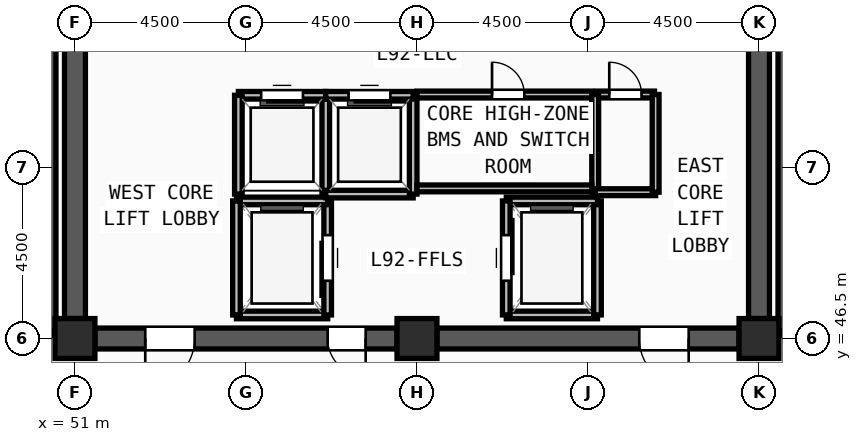
"""IFC4 building model, lengths in metres.
Left out: names, types, materials, properties, quantities, classifications, styles, units other than length and angle.
Written with IfcOpenShell. Run it as: python <this file> out.ifc"""

import sys

from ifc_helpers import new_model, si_unit, direction, frame, frame_2d, origin, origin_2d, place, context, subcontext, project, spatial, rectangle, extrude, source, transform, mapped, element, fill, save


model = new_model("IFC4")
c1 = context("Model", 3, precision=1e-05, world=origin(), true_north=direction((0.0, 1.0)))
c2 = subcontext(c1, "Body", "Model", "MODEL_VIEW")
j1 = project(units=[si_unit("LENGTHUNIT", "METRE"), si_unit("PLANEANGLEUNIT", "RADIAN")], contexts=[c1])
p1 = place(None, origin())
s1 = spatial("IfcSite", under=j1, at=p1, CompositionType="ELEMENT")
p2 = place(p1, origin())
s2 = spatial("IfcBuilding", under=s1, at=p2, CompositionType="ELEMENT")
p3 = place(p2, frame((0.0, 0.0, 355.8)))
s3 = spatial("IfcBuildingStorey", under=s2, at=p3, CompositionType="ELEMENT", Elevation=355.8)
m1 = source(origin(), c2, "Body", "SweptSolid", [
    extrude(rectangle(XDim=1.05, YDim=1.05, at=origin_2d()), origin(), (0.0, 0.0, 1.0), 4.8),
])
for number, where, z_axis, x_axis in (
    (1, (51.0, 46.5, 0.0), (0.0, 0.0, 1.0), (1.0, 0.0, 0.0)),
    (2, (60.0, 46.5, 0.0), (0.0, 0.0, 1.0), (1.0, 0.0, 0.0)),
    (3, (69.0, 46.5, 0.0), (0.0, 0.0, 1.0), (1.0, 0.0, 0.0)),
):
    element("IfcColumn", number, at=place(p3, frame(where, z_axis=z_axis, x_axis=x_axis)), inside=s3, PredefinedType="COLUMN", context=c2, shape_type="MappedRepresentation", body=[
        mapped(m1, transform((0.0, 0.0, 0.0), x_axis=(1.0, 0.0, 0.0), y_axis=(0.0, 1.0, 0.0), z_axis=(0.0, 0.0, 1.0), scale=1.0)),
    ])
p4 = place(p3, frame((69.0, 60.975, 0.0), z_axis=(0.0, 0.0, 1.0), x_axis=(0.0, -1.0, 0.0)))
e4 = element("IfcWall", 4, at=p4, inside=s3, PredefinedType="SHEAR", context=c2, shape_type="SweptSolid", body=[
    extrude(rectangle(XDim=13.95, YDim=0.55, at=frame_2d((6.975, 0.0))), origin(), (0.0, 0.0, 1.0), 4.35),
])
m2 = source(origin(), c2, "Body", "SweptSolid", [
    extrude(rectangle(XDim=1.2, YDim=2.2, at=frame_2d((0.6, 1.1))), frame((0.0, 0.285, 0.0), z_axis=(0.0, -1.0, 0.0), x_axis=(1.0, 0.0, 0.0)), (0.0, 0.0, 1.0), 0.57),
])
p5 = place(p4, frame((1.425, 0.0, 0.0)))
e5 = element("IfcOpeningElement", 5, at=p5, cuts=e4, PredefinedType="OPENING", context=c2, shape_type="MappedRepresentation", body=[
    mapped(m2, transform((0.0, 0.0, 0.0), x_axis=(1.0, 0.0, 0.0), y_axis=(0.0, 1.0, 0.0), z_axis=(0.0, 0.0, 1.0), scale=1.0)),
])
p6 = place(p3, frame((68.475, 46.5, 0.0), z_axis=(0.0, 0.0, 1.0), x_axis=(-1.0, 0.0, 0.0)))
e6 = element("IfcWall", 6, at=p6, inside=s3, PredefinedType="SHEAR", context=c2, shape_type="SweptSolid", body=[
    extrude(rectangle(XDim=7.95, YDim=0.55, at=frame_2d((3.975, 0.0))), origin(), (0.0, 0.0, 1.0), 4.35),
])
m3 = source(origin(), c2, "Body", "SweptSolid", [
    extrude(rectangle(XDim=1.3, YDim=2.2, at=frame_2d((0.65, 1.1))), frame((0.0, 0.285, 0.0), z_axis=(0.0, -1.0, 0.0), x_axis=(1.0, 0.0, 0.0)), (0.0, 0.0, 1.0), 0.57),
])
p7 = place(p6, frame((1.325, 0.0, 0.0)))
e7 = element("IfcOpeningElement", 7, at=p7, cuts=e6, PredefinedType="OPENING", context=c2, shape_type="MappedRepresentation", body=[
    mapped(m3, transform((0.0, 0.0, 0.0), x_axis=(1.0, 0.0, 0.0), y_axis=(0.0, 1.0, 0.0), z_axis=(0.0, 0.0, 1.0), scale=1.0)),
])
p8 = place(p3, frame((59.475, 46.5, 0.0), z_axis=(0.0, 0.0, 1.0), x_axis=(-1.0, 0.0, 0.0)))
e8 = element("IfcWall", 8, at=p8, inside=s3, PredefinedType="SHEAR", context=c2, shape_type="SweptSolid", body=[
    extrude(rectangle(XDim=7.95, YDim=0.55, at=frame_2d((3.975, 0.0))), origin(), (0.0, 0.0, 1.0), 4.35),
])
p9 = place(p8, frame((5.325, 0.0, 0.0)))
e9 = element("IfcOpeningElement", 9, at=p9, cuts=e8, PredefinedType="OPENING", context=c2, shape_type="MappedRepresentation", body=[
    mapped(m3, transform((0.0, 0.0, 0.0), x_axis=(1.0, 0.0, 0.0), y_axis=(0.0, 1.0, 0.0), z_axis=(0.0, 0.0, 1.0), scale=1.0)),
])
m4 = source(origin(), c2, "Body", "SweptSolid", [
    extrude(rectangle(XDim=1.0, YDim=2.2, at=frame_2d((0.5, 1.1))), frame((0.0, 0.285, 0.0), z_axis=(0.0, -1.0, 0.0), x_axis=(1.0, 0.0, 0.0)), (0.0, 0.0, 1.0), 0.57),
])
p10 = place(p8, frame((0.825, 0.0, 0.0)))
e10 = element("IfcOpeningElement", 10, at=p10, cuts=e8, PredefinedType="OPENING", context=c2, shape_type="MappedRepresentation", body=[
    mapped(m4, transform((0.0, 0.0, 0.0), x_axis=(1.0, 0.0, 0.0), y_axis=(0.0, 1.0, 0.0), z_axis=(0.0, 0.0, 1.0), scale=1.0)),
])
p11 = place(p3, frame((51.0, 47.025, 0.0), z_axis=(0.0, 0.0, 1.0), x_axis=(0.0, 1.0, 0.0)))
e11 = element("IfcWall", 11, at=p11, inside=s3, PredefinedType="SHEAR", context=c2, shape_type="SweptSolid", body=[
    extrude(rectangle(XDim=13.95, YDim=0.55, at=frame_2d((6.975, 0.0))), origin(), (0.0, 0.0, 1.0), 4.35),
])
for number, where, z_axis, x_axis in (
    (12, (50.38, 46.7, 0.0), (0.0, 0.0, 1.0), (0.0, 1.0, 0.0)),
    (13, (69.62, 54.52, 0.0), (0.0, 0.0, 1.0), (0.0, -1.0, 0.0)),
):
    element("IfcWall", number, at=place(p3, frame(where, z_axis=z_axis, x_axis=x_axis)), inside=s3, PredefinedType="SOLIDWALL", context=c2, shape_type="SweptSolid", body=[
        extrude(rectangle(XDim=7.82, YDim=0.24, at=frame_2d((3.91, 0.0))), origin(), (0.0, 0.0, 1.0), 4.35),
    ])
p12 = place(p3, frame((55.25, 47.12, 0.0), z_axis=(0.0, 0.0, 1.0), x_axis=(1.0, 0.0, 0.0)))
e14 = element("IfcWall", 14, at=p12, inside=s3, PredefinedType="SOLIDWALL", context=c2, shape_type="SweptSolid", body=[
    extrude(rectangle(XDim=2.4, YDim=0.2, at=frame_2d((1.2, 0.0))), origin(), (0.0, 0.0, 1.0), 4.35),
])
p13 = place(p3, frame((57.65, 47.12, 0.0), z_axis=(0.0, 0.0, 1.0), x_axis=(0.0, 1.0, 0.0)))
e15 = element("IfcWall", 15, at=p13, inside=s3, PredefinedType="SOLIDWALL", context=c2, shape_type="SweptSolid", body=[
    extrude(rectangle(XDim=3.0, YDim=0.2, at=frame_2d((1.5, 0.0))), origin(), (0.0, 0.0, 1.0), 4.35),
])
m5 = source(origin(), c2, "Body", "SweptSolid", [
    extrude(rectangle(XDim=1.2, YDim=2.3, at=frame_2d((0.6, 1.15))), frame((0.0, 0.11, 0.0), z_axis=(0.0, -1.0, 0.0), x_axis=(1.0, 0.0, 0.0)), (0.0, 0.0, 1.0), 0.22),
])
p14 = place(p13, frame((0.9, 0.0, 0.0)))
e16 = element("IfcOpeningElement", 16, at=p14, cuts=e15, PredefinedType="OPENING", context=c2, shape_type="MappedRepresentation", body=[
    mapped(m5, transform((0.0, 0.0, 0.0), x_axis=(1.0, 0.0, 0.0), y_axis=(0.0, 1.0, 0.0), z_axis=(0.0, 0.0, 1.0), scale=1.0)),
])
p15 = place(p3, frame((57.65, 50.12, 0.0), z_axis=(0.0, 0.0, 1.0), x_axis=(-1.0, 0.0, 0.0)))
e17 = element("IfcWall", 17, at=p15, inside=s3, PredefinedType="SOLIDWALL", context=c2, shape_type="SweptSolid", body=[
    extrude(rectangle(XDim=2.4, YDim=0.2, at=frame_2d((1.2, 0.0))), origin(), (0.0, 0.0, 1.0), 4.35),
])
p16 = place(p3, frame((55.25, 50.12, 0.0), z_axis=(0.0, 0.0, 1.0), x_axis=(0.0, -1.0, 0.0)))
e18 = element("IfcWall", 18, at=p16, inside=s3, PredefinedType="SOLIDWALL", context=c2, shape_type="SweptSolid", body=[
    extrude(rectangle(XDim=3.0, YDim=0.2, at=frame_2d((1.5, 0.0))), origin(), (0.0, 0.0, 1.0), 4.35),
])
p17 = place(p3, frame((62.35, 47.12, 0.0), z_axis=(0.0, 0.0, 1.0), x_axis=(1.0, 0.0, 0.0)))
e19 = element("IfcWall", 19, at=p17, inside=s3, PredefinedType="SOLIDWALL", context=c2, shape_type="SweptSolid", body=[
    extrude(rectangle(XDim=2.4, YDim=0.2, at=frame_2d((1.2, 0.0))), origin(), (0.0, 0.0, 1.0), 4.35),
])
p18 = place(p3, frame((64.75, 47.12, 0.0), z_axis=(0.0, 0.0, 1.0), x_axis=(0.0, 1.0, 0.0)))
e20 = element("IfcWall", 20, at=p18, inside=s3, PredefinedType="SOLIDWALL", context=c2, shape_type="SweptSolid", body=[
    extrude(rectangle(XDim=3.0, YDim=0.2, at=frame_2d((1.5, 0.0))), origin(), (0.0, 0.0, 1.0), 4.35),
])
p19 = place(p3, frame((64.75, 50.12, 0.0), z_axis=(0.0, 0.0, 1.0), x_axis=(-1.0, 0.0, 0.0)))
e21 = element("IfcWall", 21, at=p19, inside=s3, PredefinedType="SOLIDWALL", context=c2, shape_type="SweptSolid", body=[
    extrude(rectangle(XDim=2.4, YDim=0.2, at=frame_2d((1.2, 0.0))), origin(), (0.0, 0.0, 1.0), 4.35),
])
p20 = place(p3, frame((62.35, 50.12, 0.0), z_axis=(0.0, 0.0, 1.0), x_axis=(0.0, -1.0, 0.0)))
e22 = element("IfcWall", 22, at=p20, inside=s3, PredefinedType="SOLIDWALL", context=c2, shape_type="SweptSolid", body=[
    extrude(rectangle(XDim=3.0, YDim=0.2, at=frame_2d((1.5, 0.0))), origin(), (0.0, 0.0, 1.0), 4.35),
])
p21 = place(p20, frame((0.9, 0.0, 0.0)))
e23 = element("IfcOpeningElement", 23, at=p21, cuts=e22, PredefinedType="OPENING", context=c2, shape_type="MappedRepresentation", body=[
    mapped(m5, transform((0.0, 0.0, 0.0), x_axis=(1.0, 0.0, 0.0), y_axis=(0.0, 1.0, 0.0), z_axis=(0.0, 0.0, 1.0), scale=1.0)),
])
p22 = place(p3, frame((57.6, 50.3, 0.0), z_axis=(0.0, 0.0, 1.0), x_axis=(0.0, 1.0, 0.0)))
e24 = element("IfcWall", 24, at=p22, inside=s3, PredefinedType="SOLIDWALL", context=c2, shape_type="SweptSolid", body=[
    extrude(rectangle(XDim=2.6, YDim=0.2, at=frame_2d((1.3, 0.0))), origin(), (0.0, 0.0, 1.0), 4.35),
])
p23 = place(p3, frame((57.6, 52.9, 0.0), z_axis=(0.0, 0.0, 1.0), x_axis=(-1.0, 0.0, 0.0)))
e25 = element("IfcWall", 25, at=p23, inside=s3, PredefinedType="SOLIDWALL", context=c2, shape_type="SweptSolid", body=[
    extrude(rectangle(XDim=2.3, YDim=0.2, at=frame_2d((1.15, 0.0))), origin(), (0.0, 0.0, 1.0), 4.35),
])
m6 = source(origin(), c2, "Body", "SweptSolid", [
    extrude(rectangle(XDim=1.1, YDim=2.2, at=frame_2d((0.55, 1.1))), frame((0.0, 0.11, 0.0), z_axis=(0.0, -1.0, 0.0), x_axis=(1.0, 0.0, 0.0)), (0.0, 0.0, 1.0), 0.22),
])
p24 = place(p23, frame((0.6, 0.0, 0.0)))
e26 = element("IfcOpeningElement", 26, at=p24, cuts=e25, PredefinedType="OPENING", context=c2, shape_type="MappedRepresentation", body=[
    mapped(m6, transform((0.0, 0.0, 0.0), x_axis=(1.0, 0.0, 0.0), y_axis=(0.0, 1.0, 0.0), z_axis=(0.0, 0.0, 1.0), scale=1.0)),
])
p25 = place(p3, frame((55.3, 52.9, 0.0), z_axis=(0.0, 0.0, 1.0), x_axis=(0.0, -1.0, 0.0)))
e27 = element("IfcWall", 27, at=p25, inside=s3, PredefinedType="SOLIDWALL", context=c2, shape_type="SweptSolid", body=[
    extrude(rectangle(XDim=2.6, YDim=0.2, at=frame_2d((1.3, 0.0))), origin(), (0.0, 0.0, 1.0), 4.35),
])
p26 = place(p3, frame((57.6, 50.3, 0.0), z_axis=(0.0, 0.0, 1.0), x_axis=(1.0, 0.0, 0.0)))
e28 = element("IfcWall", 28, at=p26, inside=s3, PredefinedType="SOLIDWALL", context=c2, shape_type="SweptSolid", body=[
    extrude(rectangle(XDim=2.3, YDim=0.2, at=frame_2d((1.15, 0.0))), origin(), (0.0, 0.0, 1.0), 4.35),
])
p27 = place(p3, frame((59.9, 50.3, 0.0), z_axis=(0.0, 0.0, 1.0), x_axis=(0.0, 1.0, 0.0)))
e29 = element("IfcWall", 29, at=p27, inside=s3, PredefinedType="SOLIDWALL", context=c2, shape_type="SweptSolid", body=[
    extrude(rectangle(XDim=2.6, YDim=0.2, at=frame_2d((1.3, 0.0))), origin(), (0.0, 0.0, 1.0), 4.35),
])
p28 = place(p3, frame((59.9, 52.9, 0.0), z_axis=(0.0, 0.0, 1.0), x_axis=(-1.0, 0.0, 0.0)))
e30 = element("IfcWall", 30, at=p28, inside=s3, PredefinedType="SOLIDWALL", context=c2, shape_type="SweptSolid", body=[
    extrude(rectangle(XDim=2.3, YDim=0.2, at=frame_2d((1.15, 0.0))), origin(), (0.0, 0.0, 1.0), 4.35),
])
p29 = place(p28, frame((0.6, 0.0, 0.0)))
e31 = element("IfcOpeningElement", 31, at=p29, cuts=e30, PredefinedType="OPENING", context=c2, shape_type="MappedRepresentation", body=[
    mapped(m6, transform((0.0, 0.0, 0.0), x_axis=(1.0, 0.0, 0.0), y_axis=(0.0, 1.0, 0.0), z_axis=(0.0, 0.0, 1.0), scale=1.0)),
])
p30 = place(p3, frame((60.0, 52.92, 0.0), z_axis=(0.0, 0.0, 1.0), x_axis=(1.0, 0.0, 0.0)))
e32 = element("IfcWall", 32, at=p30, inside=s3, PredefinedType="PARTITIONING", context=c2, shape_type="SweptSolid", body=[
    extrude(rectangle(XDim=4.6, YDim=0.18, at=frame_2d((2.3, 0.0))), origin(), (0.0, 0.0, 1.0), 4.35),
])
m7 = source(origin(), c2, "Body", "SweptSolid", [
    extrude(rectangle(XDim=0.85, YDim=2.1, at=frame_2d((0.425, 1.05))), frame((0.0, 0.1, 0.0), z_axis=(0.0, -1.0, 0.0), x_axis=(1.0, 0.0, 0.0)), (0.0, 0.0, 1.0), 0.2),
])
p31 = place(p30, frame((1.975, 0.0, 0.0)))
e33 = element("IfcOpeningElement", 33, at=p31, cuts=e32, PredefinedType="OPENING", context=c2, shape_type="MappedRepresentation", body=[
    mapped(m7, transform((0.0, 0.0, 0.0), x_axis=(1.0, 0.0, 0.0), y_axis=(0.0, 1.0, 0.0), z_axis=(0.0, 0.0, 1.0), scale=1.0)),
])
p32 = place(p3, frame((64.72, 52.92, 0.0), z_axis=(0.0, 0.0, 1.0), x_axis=(1.0, 0.0, 0.0)))
e34 = element("IfcWall", 34, at=p32, inside=s3, PredefinedType="PARTITIONING", context=c2, shape_type="SweptSolid", body=[
    extrude(rectangle(XDim=1.53, YDim=0.18, at=frame_2d((0.765, 0.0))), origin(), (0.0, 0.0, 1.0), 4.35),
])
p33 = place(p32, frame((0.34, 0.0, 0.0)))
e35 = element("IfcOpeningElement", 35, at=p33, cuts=e34, PredefinedType="OPENING", context=c2, shape_type="MappedRepresentation", body=[
    mapped(m7, transform((0.0, 0.0, 0.0), x_axis=(1.0, 0.0, 0.0), y_axis=(0.0, 1.0, 0.0), z_axis=(0.0, 0.0, 1.0), scale=1.0)),
])
p34 = place(p3, frame((64.69, 50.35, 0.0), z_axis=(0.0, 0.0, 1.0), x_axis=(0.0, 1.0, 0.0)))
e36 = element("IfcWall", 36, at=p34, inside=s3, PredefinedType="PARTITIONING", context=c2, shape_type="SweptSolid", body=[
    extrude(rectangle(XDim=2.57, YDim=0.18, at=frame_2d((1.285, 0.0))), origin(), (0.0, 0.0, 1.0), 4.35),
])
p35 = place(p3, frame((64.69, 50.35, 0.0), z_axis=(0.0, 0.0, 1.0), x_axis=(1.0, 0.0, 0.0)))
e37 = element("IfcWall", 37, at=p35, inside=s3, PredefinedType="PARTITIONING", context=c2, shape_type="SweptSolid", body=[
    extrude(rectangle(XDim=1.59, YDim=0.18, at=frame_2d((0.795, 0.0))), origin(), (0.0, 0.0, 1.0), 4.35),
])
p36 = place(p3, frame((66.28, 50.35, 0.0), z_axis=(0.0, 0.0, 1.0), x_axis=(0.0, 1.0, 0.0)))
e38 = element("IfcWall", 38, at=p36, inside=s3, PredefinedType="PARTITIONING", context=c2, shape_type="SweptSolid", body=[
    extrude(rectangle(XDim=2.57, YDim=0.18, at=frame_2d((1.285, 0.0))), origin(), (0.0, 0.0, 1.0), 4.35),
])
p37 = place(p3, frame((60.0, 50.45, 0.0), z_axis=(0.0, 0.0, 1.0), x_axis=(1.0, 0.0, 0.0)))
e39 = element("IfcWall", 39, at=p37, inside=s3, PredefinedType="PARTITIONING", context=c2, shape_type="SweptSolid", body=[
    extrude(rectangle(XDim=4.6, YDim=0.18, at=frame_2d((2.3, 0.0))), origin(), (0.0, 0.0, 1.0), 4.35),
])
m8 = source(origin(), c2, "Body", "SweptSolid", [
    extrude(rectangle(XDim=1.3, YDim=2.2, at=frame_2d((0.65, 1.1))), frame((0.0, 0.025, 0.0), z_axis=(0.0, -1.0, 0.0), x_axis=(1.0, 0.0, 0.0)), (0.0, 0.0, 1.0), 0.05),
])
p38 = place(p9, origin())
e40 = element("IfcDoor", 40, at=p38, inside=s3, OperationType="SINGLE_SWING_RIGHT", PredefinedType="DOOR", context=c2, shape_type="MappedRepresentation", body=[
    mapped(m8, transform((0.0, 0.0, 0.0), x_axis=(1.0, 0.0, 0.0), y_axis=(0.0, 1.0, 0.0), z_axis=(0.0, 0.0, 1.0), scale=1.0)),
])
fill(e9, e40)
m9 = source(origin(), c2, "Body", "SweptSolid", [
    extrude(rectangle(XDim=1.0, YDim=2.2, at=frame_2d((0.5, 1.1))), frame((0.0, 0.025, 0.0), z_axis=(0.0, -1.0, 0.0), x_axis=(1.0, 0.0, 0.0)), (0.0, 0.0, 1.0), 0.05),
])
p39 = place(p10, origin())
e41 = element("IfcDoor", 41, at=p39, inside=s3, OperationType="SINGLE_SWING_LEFT", PredefinedType="DOOR", context=c2, shape_type="MappedRepresentation", body=[
    mapped(m9, transform((0.0, 0.0, 0.0), x_axis=(1.0, 0.0, 0.0), y_axis=(0.0, 1.0, 0.0), z_axis=(0.0, 0.0, 1.0), scale=1.0)),
])
fill(e10, e41)
p40 = place(p7, origin())
e42 = element("IfcDoor", 42, at=p40, inside=s3, OperationType="SINGLE_SWING_LEFT", PredefinedType="DOOR", context=c2, shape_type="MappedRepresentation", body=[
    mapped(m8, transform((0.0, 0.0, 0.0), x_axis=(1.0, 0.0, 0.0), y_axis=(0.0, 1.0, 0.0), z_axis=(0.0, 0.0, 1.0), scale=1.0)),
])
fill(e7, e42)
m10 = source(origin(), c2, "Body", "SweptSolid", [
    extrude(rectangle(XDim=1.2, YDim=2.3, at=frame_2d((0.6, 1.15))), frame((0.0, 0.025, 0.0), z_axis=(0.0, -1.0, 0.0), x_axis=(1.0, 0.0, 0.0)), (0.0, 0.0, 1.0), 0.05),
])
p41 = place(p14, origin())
e43 = element("IfcDoor", 43, at=p41, inside=s3, OperationType="SLIDING_TO_LEFT", PredefinedType="DOOR", context=c2, shape_type="MappedRepresentation", body=[
    mapped(m10, transform((0.0, 0.0, 0.0), x_axis=(1.0, 0.0, 0.0), y_axis=(0.0, 1.0, 0.0), z_axis=(0.0, 0.0, 1.0), scale=1.0)),
])
fill(e16, e43)
p42 = place(p21, origin())
e44 = element("IfcDoor", 44, at=p42, inside=s3, OperationType="SLIDING_TO_LEFT", PredefinedType="DOOR", context=c2, shape_type="MappedRepresentation", body=[
    mapped(m10, transform((0.0, 0.0, 0.0), x_axis=(1.0, 0.0, 0.0), y_axis=(0.0, 1.0, 0.0), z_axis=(0.0, 0.0, 1.0), scale=1.0)),
])
fill(e23, e44)
m11 = source(origin(), c2, "Body", "SweptSolid", [
    extrude(rectangle(XDim=1.1, YDim=2.2, at=frame_2d((0.55, 1.1))), frame((0.0, 0.025, 0.0), z_axis=(0.0, -1.0, 0.0), x_axis=(1.0, 0.0, 0.0)), (0.0, 0.0, 1.0), 0.05),
])
p43 = place(p24, origin())
e45 = element("IfcDoor", 45, at=p43, inside=s3, OperationType="SLIDING_TO_LEFT", PredefinedType="DOOR", context=c2, shape_type="MappedRepresentation", body=[
    mapped(m11, transform((0.0, 0.0, 0.0), x_axis=(1.0, 0.0, 0.0), y_axis=(0.0, 1.0, 0.0), z_axis=(0.0, 0.0, 1.0), scale=1.0)),
])
fill(e26, e45)
p44 = place(p29, origin())
e46 = element("IfcDoor", 46, at=p44, inside=s3, OperationType="SLIDING_TO_LEFT", PredefinedType="DOOR", context=c2, shape_type="MappedRepresentation", body=[
    mapped(m11, transform((0.0, 0.0, 0.0), x_axis=(1.0, 0.0, 0.0), y_axis=(0.0, 1.0, 0.0), z_axis=(0.0, 0.0, 1.0), scale=1.0)),
])
fill(e31, e46)
m12 = source(origin(), c2, "Body", "SweptSolid", [
    extrude(rectangle(XDim=0.85, YDim=2.1, at=frame_2d((0.425, 1.05))), frame((0.0, 0.025, 0.0), z_axis=(0.0, -1.0, 0.0), x_axis=(1.0, 0.0, 0.0)), (0.0, 0.0, 1.0), 0.05),
])
p45 = place(p31, origin())
e47 = element("IfcDoor", 47, at=p45, inside=s3, OperationType="SINGLE_SWING_LEFT", PredefinedType="DOOR", context=c2, shape_type="MappedRepresentation", body=[
    mapped(m12, transform((0.0, 0.0, 0.0), x_axis=(1.0, 0.0, 0.0), y_axis=(0.0, 1.0, 0.0), z_axis=(0.0, 0.0, 1.0), scale=1.0)),
])
fill(e33, e47)
p46 = place(p33, origin())
e48 = element("IfcDoor", 48, at=p46, inside=s3, OperationType="SINGLE_SWING_LEFT", PredefinedType="DOOR", context=c2, shape_type="MappedRepresentation", body=[
    mapped(m12, transform((0.0, 0.0, 0.0), x_axis=(1.0, 0.0, 0.0), y_axis=(0.0, 1.0, 0.0), z_axis=(0.0, 0.0, 1.0), scale=1.0)),
])
fill(e35, e48)
save(model, sys.argv[1])
